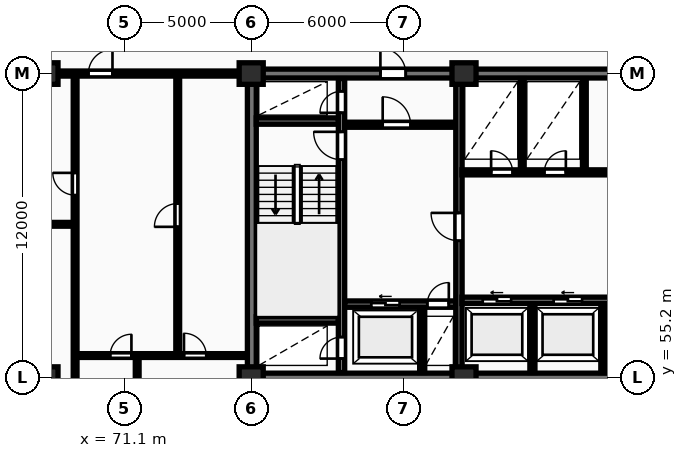
"""IFC4 building model, lengths in metres.
Left out: names, types, materials, properties, quantities, classifications, styles, units other than length and angle.
Written with IfcOpenShell. Run it as: python <this file> out.ifc"""

import sys

from ifc_helpers import new_model, si_unit, direction, frame, frame_2d, origin, origin_2d, place, context, subcontext, project, spatial, rectangle, extrude, element, fill, save


model = new_model("IFC4")
c1 = context("Model", 3, precision=1e-05, world=origin(), true_north=direction((0.0, 1.0)))
c2 = subcontext(c1, "Body", "Model", "MODEL_VIEW")
j1 = project(units=[si_unit("LENGTHUNIT", "METRE"), si_unit("PLANEANGLEUNIT", "RADIAN")], contexts=[c1])
p1 = place(None, origin())
s1 = spatial("IfcSite", under=j1, at=p1, CompositionType="ELEMENT")
p2 = place(p1, origin())
s2 = spatial("IfcBuilding", under=s1, at=p2, CompositionType="ELEMENT")
p3 = place(p2, frame((0.0, 0.0, 87.3)))
s3 = spatial("IfcBuildingStorey", under=s2, at=p3, CompositionType="ELEMENT", Elevation=87.3)
for number, where, z_axis, x_axis in (
    (1, (68.0, 55.2, 0.0), (0.0, 0.0, 1.0), (1.0, 0.0, 0.0)),
    (2, (68.0, 67.2, 0.0), (0.0, 0.0, 1.0), (1.0, 0.0, 0.0)),
    (3, (76.1, 55.2, 0.0), (0.0, 0.0, 1.0), (1.0, 0.0, 0.0)),
    (4, (76.1, 67.2, 0.0), (0.0, 0.0, 1.0), (1.0, 0.0, 0.0)),
    (5, (84.5, 55.2, 0.0), (0.0, 0.0, 1.0), (1.0, 0.0, 0.0)),
    (6, (84.5, 67.2, 0.0), (0.0, 0.0, 1.0), (1.0, 0.0, 0.0)),
):
    element("IfcColumn", number, at=place(p3, frame(where, z_axis=z_axis, x_axis=x_axis)), inside=s3, PredefinedType="COLUMN", context=c2, shape_type="SweptSolid", body=[
        extrude(rectangle(XDim=0.95, YDim=0.85, at=origin_2d()), origin(), (0.0, 0.0, 1.0), 3.25),
    ])
p4 = place(p3, frame((75.95, 55.2, 0.0), z_axis=(0.0, 0.0, 1.0), x_axis=(1.0, 0.0, 0.0)))
e7 = element("IfcWall", 7, at=p4, inside=s3, PredefinedType="SHEAR", context=c2, shape_type="SweptSolid", body=[
    extrude(rectangle(XDim=36.3, YDim=0.35, at=frame_2d((18.15, 0.0))), origin(), (0.0, 0.0, 1.0), 3.25),
])
p5 = place(p3, frame((76.125, 55.375, 0.0), z_axis=(0.0, 0.0, 1.0), x_axis=(0.0, 1.0, 0.0)))
e8 = element("IfcWall", 8, at=p5, inside=s3, PredefinedType="SHEAR", context=c2, shape_type="SweptSolid", body=[
    extrude(rectangle(XDim=11.65, YDim=0.35, at=frame_2d((5.825, 0.0))), origin(), (0.0, 0.0, 1.0), 3.25),
])
p6 = place(p3, frame((75.95, 67.2, 0.0), z_axis=(0.0, 0.0, 1.0), x_axis=(1.0, 0.0, 0.0)))
e9 = element("IfcWall", 9, at=p6, inside=s3, PredefinedType="SHEAR", context=c2, shape_type="SweptSolid", body=[
    extrude(rectangle(XDim=36.3, YDim=0.35, at=frame_2d((18.15, 0.0))), origin(), (0.0, 0.0, 1.0), 3.25),
])
p7 = place(p6, frame((5.25, 0.0, 0.0)))
e10 = element("IfcOpeningElement", 10, at=p7, cuts=e9, PredefinedType="OPENING", context=c2, shape_type="SweptSolid", body=[
    extrude(rectangle(XDim=1.0, YDim=2.15, at=frame_2d((0.5, 1.075))), frame((0.0, 0.185, 0.0), z_axis=(0.0, -1.0, 0.0), x_axis=(1.0, 0.0, 0.0)), (0.0, 0.0, 1.0), 0.37),
])
p8 = place(p6, frame((21.6, 0.0, 0.0)))
e11 = element("IfcOpeningElement", 11, at=p8, cuts=e9, PredefinedType="OPENING", context=c2, shape_type="SweptSolid", body=[
    extrude(rectangle(XDim=1.5, YDim=2.2, at=frame_2d((0.75, 1.1))), frame((0.0, 0.185, 0.0), z_axis=(0.0, -1.0, 0.0), x_axis=(1.0, 0.0, 0.0)), (0.0, 0.0, 1.0), 0.37),
])
p9 = place(p6, frame((30.45, 0.0, 0.0)))
e12 = element("IfcOpeningElement", 12, at=p9, cuts=e9, PredefinedType="OPENING", context=c2, shape_type="SweptSolid", body=[
    extrude(rectangle(XDim=1.0, YDim=2.15, at=frame_2d((0.5, 1.075))), frame((0.0, 0.185, 0.0), z_axis=(0.0, -1.0, 0.0), x_axis=(1.0, 0.0, 0.0)), (0.0, 0.0, 1.0), 0.37),
])
p10 = place(p3, frame((79.665, 55.4, 0.0), z_axis=(0.0, 0.0, 1.0), x_axis=(0.0, 1.0, 0.0)))
e13 = element("IfcWall", 13, at=p10, inside=s3, PredefinedType="SHEAR", context=c2, shape_type="SweptSolid", body=[
    extrude(rectangle(XDim=11.6, YDim=0.25, at=frame_2d((5.8, 0.0))), origin(), (0.0, 0.0, 1.0), 3.25),
])
p11 = place(p10, frame((0.55, 0.0, 0.0)))
e14 = element("IfcOpeningElement", 14, at=p11, cuts=e13, PredefinedType="OPENING", context=c2, shape_type="SweptSolid", body=[
    extrude(rectangle(XDim=0.85, YDim=2.05, at=frame_2d((0.425, 1.025))), frame((0.0, 0.135, 0.0), z_axis=(0.0, -1.0, 0.0), x_axis=(1.0, 0.0, 0.0)), (0.0, 0.0, 1.0), 0.27),
])
p12 = place(p10, frame((8.4, 0.0, 0.0)))
e15 = element("IfcOpeningElement", 15, at=p12, cuts=e13, PredefinedType="OPENING", context=c2, shape_type="SweptSolid", body=[
    extrude(rectangle(XDim=1.1, YDim=2.1, at=frame_2d((0.55, 1.05))), frame((0.0, 0.135, 0.0), z_axis=(0.0, -1.0, 0.0), x_axis=(1.0, 0.0, 0.0)), (0.0, 0.0, 1.0), 0.27),
])
p13 = place(p10, frame((10.25, 0.0, 0.0)))
e16 = element("IfcOpeningElement", 16, at=p13, cuts=e13, PredefinedType="OPENING", context=c2, shape_type="SweptSolid", body=[
    extrude(rectangle(XDim=0.85, YDim=2.05, at=frame_2d((0.425, 1.025))), frame((0.0, 0.135, 0.0), z_axis=(0.0, -1.0, 0.0), x_axis=(1.0, 0.0, 0.0)), (0.0, 0.0, 1.0), 0.27),
])
for number, where, z_axis, x_axis in (
    (17, (76.3, 57.475, 0.0), (0.0, 0.0, 1.0), (1.0, 0.0, 0.0)),
    (18, (76.3, 65.325, 0.0), (0.0, 0.0, 1.0), (1.0, 0.0, 0.0)),
):
    element("IfcWall", number, at=place(p3, frame(where, z_axis=z_axis, x_axis=x_axis)), inside=s3, PredefinedType="SHEAR", context=c2, shape_type="SweptSolid", body=[
        extrude(rectangle(XDim=3.24, YDim=0.25, at=frame_2d((1.62, 0.0))), origin(), (0.0, 0.0, 1.0), 3.25),
    ])
p14 = place(p3, frame((79.79, 58.1, 0.0), z_axis=(0.0, 0.0, 1.0), x_axis=(1.0, 0.0, 0.0)))
e19 = element("IfcWall", 19, at=p14, inside=s3, PredefinedType="SHEAR", context=c2, shape_type="SweptSolid", body=[
    extrude(rectangle(XDim=4.39, YDim=0.25, at=frame_2d((2.195, 0.0))), origin(), (0.0, 0.0, 1.0), 3.25),
])
p15 = place(p14, frame((1.05, 0.0, 0.0)))
e20 = element("IfcOpeningElement", 20, at=p15, cuts=e19, PredefinedType="OPENING", context=c2, shape_type="SweptSolid", body=[
    extrude(rectangle(XDim=1.12, YDim=2.12, at=frame_2d((0.56, 1.06))), frame((0.0, 0.135, 0.0), z_axis=(0.0, -1.0, 0.0), x_axis=(1.0, 0.0, 0.0)), (0.0, 0.0, 1.0), 0.27),
])
p16 = place(p14, frame((3.26, 0.0, 0.0)))
e21 = element("IfcOpeningElement", 21, at=p16, cuts=e19, PredefinedType="OPENING", context=c2, shape_type="SweptSolid", body=[
    extrude(rectangle(XDim=0.85, YDim=2.05, at=frame_2d((0.425, 1.025))), frame((0.0, 0.135, 0.0), z_axis=(0.0, -1.0, 0.0), x_axis=(1.0, 0.0, 0.0)), (0.0, 0.0, 1.0), 0.27),
])
p17 = place(p3, frame((82.85, 55.4, 0.0), z_axis=(0.0, 0.0, 1.0), x_axis=(0.0, 1.0, 0.0)))
e22 = element("IfcWall", 22, at=p17, inside=s3, PredefinedType="PARTITIONING", context=c2, shape_type="SweptSolid", body=[
    extrude(rectangle(XDim=2.56, YDim=0.2, at=frame_2d((1.28, 0.0))), origin(), (0.0, 0.0, 1.0), 2.97),
])
p18 = place(p3, frame((79.79, 65.18, 0.0), z_axis=(0.0, 0.0, 1.0), x_axis=(1.0, 0.0, 0.0)))
e23 = element("IfcWall", 23, at=p18, inside=s3, PredefinedType="PARTITIONING", context=c2, shape_type="SweptSolid", body=[
    extrude(rectangle(XDim=4.39, YDim=0.2, at=frame_2d((2.195, 0.0))), origin(), (0.0, 0.0, 1.0), 2.97),
])
p19 = place(p18, frame((1.5, 0.0, 0.0)))
e24 = element("IfcOpeningElement", 24, at=p19, cuts=e23, PredefinedType="OPENING", context=c2, shape_type="SweptSolid", body=[
    extrude(rectangle(XDim=1.1, YDim=2.1, at=frame_2d((0.55, 1.05))), frame((0.0, 0.11, 0.0), z_axis=(0.0, -1.0, 0.0), x_axis=(1.0, 0.0, 0.0)), (0.0, 0.0, 1.0), 0.22),
])
p20 = place(p3, frame((84.3, 55.4, 0.0), z_axis=(0.0, 0.0, 1.0), x_axis=(0.0, 1.0, 0.0)))
e25 = element("IfcWall", 25, at=p20, inside=s3, PredefinedType="SHEAR", context=c2, shape_type="SweptSolid", body=[
    extrude(rectangle(XDim=11.6, YDim=0.25, at=frame_2d((5.8, 0.0))), origin(), (0.0, 0.0, 1.0), 3.25),
])
p21 = place(p20, frame((5.2, 0.0, 0.0)))
e26 = element("IfcOpeningElement", 26, at=p21, cuts=e25, PredefinedType="OPENING", context=c2, shape_type="SweptSolid", body=[
    extrude(rectangle(XDim=1.1, YDim=2.1, at=frame_2d((0.55, 1.05))), frame((0.0, 0.135, 0.0), z_axis=(0.0, -1.0, 0.0), x_axis=(1.0, 0.0, 0.0)), (0.0, 0.0, 1.0), 0.27),
])
for number, where, z_axis, x_axis in (
    (27, (87.2, 55.4, 0.0), (0.0, 0.0, 1.0), (0.0, 1.0, 0.0)),
    (28, (90.0, 55.4, 0.0), (0.0, 0.0, 1.0), (0.0, 1.0, 0.0)),
):
    element("IfcWall", number, at=place(p3, frame(where, z_axis=z_axis, x_axis=x_axis)), inside=s3, PredefinedType="PARTITIONING", context=c2, shape_type="SweptSolid", body=[
        extrude(rectangle(XDim=2.72, YDim=0.2, at=frame_2d((1.36, 0.0))), origin(), (0.0, 0.0, 1.0), 2.97),
    ])
p22 = place(p3, frame((84.42, 58.25, 0.0), z_axis=(0.0, 0.0, 1.0), x_axis=(1.0, 0.0, 0.0)))
e29 = element("IfcWall", 29, at=p22, inside=s3, PredefinedType="SHEAR", context=c2, shape_type="SweptSolid", body=[
    extrude(rectangle(XDim=8.36, YDim=0.25, at=frame_2d((4.18, 0.0))), origin(), (0.0, 0.0, 1.0), 3.25),
])
p23 = place(p22, frame((0.82, 0.0, 0.0)))
e30 = element("IfcOpeningElement", 30, at=p23, cuts=e29, PredefinedType="OPENING", context=c2, shape_type="SweptSolid", body=[
    extrude(rectangle(XDim=1.12, YDim=2.12, at=frame_2d((0.56, 1.06))), frame((0.0, 0.135, 0.0), z_axis=(0.0, -1.0, 0.0), x_axis=(1.0, 0.0, 0.0)), (0.0, 0.0, 1.0), 0.27),
])
p24 = place(p22, frame((3.62, 0.0, 0.0)))
e31 = element("IfcOpeningElement", 31, at=p24, cuts=e29, PredefinedType="OPENING", context=c2, shape_type="SweptSolid", body=[
    extrude(rectangle(XDim=1.12, YDim=2.12, at=frame_2d((0.56, 1.06))), frame((0.0, 0.135, 0.0), z_axis=(0.0, -1.0, 0.0), x_axis=(1.0, 0.0, 0.0)), (0.0, 0.0, 1.0), 0.27),
])
p25 = place(p22, frame((6.42, 0.0, 0.0)))
e32 = element("IfcOpeningElement", 32, at=p25, cuts=e29, PredefinedType="OPENING", context=c2, shape_type="SweptSolid", body=[
    extrude(rectangle(XDim=1.12, YDim=2.12, at=frame_2d((0.56, 1.06))), frame((0.0, 0.135, 0.0), z_axis=(0.0, -1.0, 0.0), x_axis=(1.0, 0.0, 0.0)), (0.0, 0.0, 1.0), 0.27),
])
for number, where, z_axis, x_axis in (
    (33, (86.8, 63.4, 0.0), (0.0, 0.0, 1.0), (0.0, 1.0, 0.0)),
    (34, (89.25, 63.4, 0.0), (0.0, 0.0, 1.0), (0.0, 1.0, 0.0)),
):
    element("IfcWall", number, at=place(p3, frame(where, z_axis=z_axis, x_axis=x_axis)), inside=s3, PredefinedType="PARTITIONING", context=c2, shape_type="SweptSolid", body=[
        extrude(rectangle(XDim=3.6, YDim=0.15, at=frame_2d((1.8, 0.0))), origin(), (0.0, 0.0, 1.0), 2.97),
    ])
p26 = place(p3, frame((84.42, 63.3, 0.0), z_axis=(0.0, 0.0, 1.0), x_axis=(1.0, 0.0, 0.0)))
e35 = element("IfcWall", 35, at=p26, inside=s3, PredefinedType="PARTITIONING", context=c2, shape_type="SweptSolid", body=[
    extrude(rectangle(XDim=19.83, YDim=0.2, at=frame_2d((9.915, 0.0))), origin(), (0.0, 0.0, 1.0), 2.97),
])
p27 = place(p26, frame((1.15, 0.0, 0.0)))
e36 = element("IfcOpeningElement", 36, at=p27, cuts=e35, PredefinedType="OPENING", context=c2, shape_type="SweptSolid", body=[
    extrude(rectangle(XDim=0.85, YDim=2.05, at=frame_2d((0.425, 1.025))), frame((0.0, 0.11, 0.0), z_axis=(0.0, -1.0, 0.0), x_axis=(1.0, 0.0, 0.0)), (0.0, 0.0, 1.0), 0.22),
])
p28 = place(p26, frame((3.25, 0.0, 0.0)))
e37 = element("IfcOpeningElement", 37, at=p28, cuts=e35, PredefinedType="OPENING", context=c2, shape_type="SweptSolid", body=[
    extrude(rectangle(XDim=0.85, YDim=2.05, at=frame_2d((0.425, 1.025))), frame((0.0, 0.11, 0.0), z_axis=(0.0, -1.0, 0.0), x_axis=(1.0, 0.0, 0.0)), (0.0, 0.0, 1.0), 0.22),
])
p29 = place(p26, frame((13.08, 0.0, 0.0)))
e38 = element("IfcOpeningElement", 38, at=p29, cuts=e35, PredefinedType="OPENING", context=c2, shape_type="SweptSolid", body=[
    extrude(rectangle(XDim=1.5, YDim=2.2, at=frame_2d((0.75, 1.1))), frame((0.0, 0.11, 0.0), z_axis=(0.0, -1.0, 0.0), x_axis=(1.0, 0.0, 0.0)), (0.0, 0.0, 1.0), 0.22),
])
p30 = place(p26, frame((6.78, 0.0, 0.0)))
e39 = element("IfcOpeningElement", 39, at=p30, cuts=e35, PredefinedType="OPENING", context=c2, shape_type="SweptSolid", body=[
    extrude(rectangle(XDim=0.92, YDim=2.08, at=frame_2d((0.46, 1.04))), frame((0.0, 0.11, 0.0), z_axis=(0.0, -1.0, 0.0), x_axis=(1.0, 0.0, 0.0)), (0.0, 0.0, 1.0), 0.22),
])
p31 = place(p26, frame((16.28, 0.0, 0.0)))
e40 = element("IfcOpeningElement", 40, at=p31, cuts=e35, PredefinedType="OPENING", context=c2, shape_type="SweptSolid", body=[
    extrude(rectangle(XDim=0.92, YDim=2.08, at=frame_2d((0.46, 1.04))), frame((0.0, 0.11, 0.0), z_axis=(0.0, -1.0, 0.0), x_axis=(1.0, 0.0, 0.0)), (0.0, 0.0, 1.0), 0.22),
])
p32 = place(p3, frame((57.6, 61.25, 0.0), z_axis=(0.0, 0.0, 1.0), x_axis=(1.0, 0.0, 0.0)))
e41 = element("IfcWall", 41, at=p32, inside=s3, PredefinedType="PARTITIONING", context=c2, shape_type="SweptSolid", body=[
    extrude(rectangle(XDim=11.55, YDim=0.15, at=frame_2d((5.775, 0.0))), origin(), (0.0, 0.0, 1.0), 2.97),
])
p33 = place(p32, frame((5.355, 0.0, 0.0)))
e42 = element("IfcOpeningElement", 42, at=p33, cuts=e41, PredefinedType="OPENING", context=c2, shape_type="SweptSolid", body=[
    extrude(rectangle(XDim=0.84, YDim=2.04, at=frame_2d((0.42, 1.02))), frame((0.0, 0.085, 0.0), z_axis=(0.0, -1.0, 0.0), x_axis=(1.0, 0.0, 0.0)), (0.0, 0.0, 1.0), 0.17),
])
p34 = place(p3, frame((69.15, 51.1, 0.0), z_axis=(0.0, 0.0, 1.0), x_axis=(0.0, 1.0, 0.0)))
e43 = element("IfcWall", 43, at=p34, inside=s3, PredefinedType="PARTITIONING", context=c2, shape_type="SweptSolid", body=[
    extrude(rectangle(XDim=16.05, YDim=0.15, at=frame_2d((8.025, 0.0))), origin(), (0.0, 0.0, 1.0), 2.97),
])
p35 = place(p34, frame((11.3, 0.0, 0.0)))
e44 = element("IfcOpeningElement", 44, at=p35, cuts=e43, PredefinedType="OPENING", context=c2, shape_type="SweptSolid", body=[
    extrude(rectangle(XDim=0.88, YDim=2.06, at=frame_2d((0.44, 1.03))), frame((0.0, 0.085, 0.0), z_axis=(0.0, -1.0, 0.0), x_axis=(1.0, 0.0, 0.0)), (0.0, 0.0, 1.0), 0.17),
])
p36 = place(p3, frame((73.2, 56.07, 0.0), z_axis=(0.0, 0.0, 1.0), x_axis=(0.0, 1.0, 0.0)))
e45 = element("IfcWall", 45, at=p36, inside=s3, PredefinedType="PARTITIONING", context=c2, shape_type="SweptSolid", body=[
    extrude(rectangle(XDim=11.08, YDim=0.15, at=frame_2d((5.54, 0.0))), origin(), (0.0, 0.0, 1.0), 2.97),
])
p37 = place(p36, frame((5.08, 0.0, 0.0)))
e46 = element("IfcOpeningElement", 46, at=p37, cuts=e45, PredefinedType="OPENING", context=c2, shape_type="SweptSolid", body=[
    extrude(rectangle(XDim=0.92, YDim=2.08, at=frame_2d((0.46, 1.04))), frame((0.0, 0.085, 0.0), z_axis=(0.0, -1.0, 0.0), x_axis=(1.0, 0.0, 0.0)), (0.0, 0.0, 1.0), 0.17),
])
p38 = place(p3, frame((71.6, 51.1, 0.0), z_axis=(0.0, 0.0, 1.0), x_axis=(0.0, 1.0, 0.0)))
e47 = element("IfcWall", 47, at=p38, inside=s3, PredefinedType="PARTITIONING", context=c2, shape_type="SweptSolid", body=[
    extrude(rectangle(XDim=4.97, YDim=0.15, at=frame_2d((2.485, 0.0))), origin(), (0.0, 0.0, 1.0), 2.97),
])
p39 = place(p3, frame((69.17, 56.07, 0.0), z_axis=(0.0, 0.0, 1.0), x_axis=(1.0, 0.0, 0.0)))
e48 = element("IfcWall", 48, at=p39, inside=s3, PredefinedType="PARTITIONING", context=c2, shape_type="SweptSolid", body=[
    extrude(rectangle(XDim=6.76, YDim=0.15, at=frame_2d((3.38, 0.0))), origin(), (0.0, 0.0, 1.0), 2.97),
])
p40 = place(p39, frame((1.362, 0.0, 0.0)))
e49 = element("IfcOpeningElement", 49, at=p40, cuts=e48, PredefinedType="OPENING", context=c2, shape_type="SweptSolid", body=[
    extrude(rectangle(XDim=0.84, YDim=2.04, at=frame_2d((0.42, 1.02))), frame((0.0, 0.085, 0.0), z_axis=(0.0, -1.0, 0.0), x_axis=(1.0, 0.0, 0.0)), (0.0, 0.0, 1.0), 0.17),
])
p41 = place(p39, frame((4.277, 0.0, 0.0)))
e50 = element("IfcOpeningElement", 50, at=p41, cuts=e48, PredefinedType="OPENING", context=c2, shape_type="SweptSolid", body=[
    extrude(rectangle(XDim=0.88, YDim=2.06, at=frame_2d((0.44, 1.03))), frame((0.0, 0.085, 0.0), z_axis=(0.0, -1.0, 0.0), x_axis=(1.0, 0.0, 0.0)), (0.0, 0.0, 1.0), 0.17),
])
p42 = place(p3, frame((57.6, 67.2, 0.0), z_axis=(0.0, 0.0, 1.0), x_axis=(1.0, 0.0, 0.0)))
e51 = element("IfcWall", 51, at=p42, inside=s3, PredefinedType="PARTITIONING", context=c2, shape_type="SweptSolid", body=[
    extrude(rectangle(XDim=18.35, YDim=0.2, at=frame_2d((9.175, 0.0))), origin(), (0.0, 0.0, 1.0), 2.433),
])
p43 = place(p42, frame((12.075, 0.0, 0.0)))
e52 = element("IfcOpeningElement", 52, at=p43, cuts=e51, PredefinedType="OPENING", context=c2, shape_type="SweptSolid", body=[
    extrude(rectangle(XDim=0.95, YDim=2.15, at=frame_2d((0.475, 1.075))), frame((0.0, 0.11, 0.0), z_axis=(0.0, -1.0, 0.0), x_axis=(1.0, 0.0, 0.0)), (0.0, 0.0, 1.0), 0.22),
])
p44 = place(p7, origin())
e53 = element("IfcDoor", 53, at=p44, inside=s3, OperationType="SINGLE_SWING_LEFT", PredefinedType="DOOR", context=c2, shape_type="SweptSolid", body=[
    extrude(rectangle(XDim=1.0, YDim=2.15, at=frame_2d((0.5, 1.075))), frame((0.0, 0.025, 0.0), z_axis=(0.0, -1.0, 0.0), x_axis=(1.0, 0.0, 0.0)), (0.0, 0.0, 1.0), 0.05),
])
fill(e10, e53)
p45 = place(p11, origin())
e54 = element("IfcDoor", 54, at=p45, inside=s3, OperationType="SINGLE_SWING_LEFT", PredefinedType="DOOR", context=c2, shape_type="SweptSolid", body=[
    extrude(rectangle(XDim=0.85, YDim=2.05, at=frame_2d((0.425, 1.025))), frame((0.0, 0.025, 0.0), z_axis=(0.0, -1.0, 0.0), x_axis=(1.0, 0.0, 0.0)), (0.0, 0.0, 1.0), 0.05),
])
fill(e14, e54)
p46 = place(p12, origin())
e55 = element("IfcDoor", 55, at=p46, inside=s3, OperationType="SINGLE_SWING_RIGHT", PredefinedType="DOOR", context=c2, shape_type="SweptSolid", body=[
    extrude(rectangle(XDim=1.1, YDim=2.1, at=frame_2d((0.55, 1.05))), frame((0.0, 0.025, 0.0), z_axis=(0.0, -1.0, 0.0), x_axis=(1.0, 0.0, 0.0)), (0.0, 0.0, 1.0), 0.05),
])
fill(e15, e55)
p47 = place(p13, origin())
e56 = element("IfcDoor", 56, at=p47, inside=s3, OperationType="SINGLE_SWING_LEFT", PredefinedType="DOOR", context=c2, shape_type="SweptSolid", body=[
    extrude(rectangle(XDim=0.85, YDim=2.05, at=frame_2d((0.425, 1.025))), frame((0.0, 0.025, 0.0), z_axis=(0.0, -1.0, 0.0), x_axis=(1.0, 0.0, 0.0)), (0.0, 0.0, 1.0), 0.05),
])
fill(e16, e56)
p48 = place(p15, origin())
e57 = element("IfcDoor", 57, at=p48, inside=s3, OperationType="SLIDING_TO_LEFT", PredefinedType="DOOR", context=c2, shape_type="SweptSolid", body=[
    extrude(rectangle(XDim=1.12, YDim=2.12, at=frame_2d((0.56, 1.06))), frame((0.0, 0.025, 0.0), z_axis=(0.0, -1.0, 0.0), x_axis=(1.0, 0.0, 0.0)), (0.0, 0.0, 1.0), 0.05),
])
fill(e20, e57)
p49 = place(p16, origin())
e58 = element("IfcDoor", 58, at=p49, inside=s3, OperationType="SINGLE_SWING_RIGHT", PredefinedType="DOOR", context=c2, shape_type="SweptSolid", body=[
    extrude(rectangle(XDim=0.85, YDim=2.05, at=frame_2d((0.425, 1.025))), frame((0.0, 0.025, 0.0), z_axis=(0.0, -1.0, 0.0), x_axis=(1.0, 0.0, 0.0)), (0.0, 0.0, 1.0), 0.05),
])
fill(e21, e58)
p50 = place(p19, origin())
e59 = element("IfcDoor", 59, at=p50, inside=s3, OperationType="SINGLE_SWING_LEFT", PredefinedType="DOOR", context=c2, shape_type="SweptSolid", body=[
    extrude(rectangle(XDim=1.1, YDim=2.1, at=frame_2d((0.55, 1.05))), frame((0.0, 0.025, 0.0), z_axis=(0.0, -1.0, 0.0), x_axis=(1.0, 0.0, 0.0)), (0.0, 0.0, 1.0), 0.05),
])
fill(e24, e59)
p51 = place(p21, origin())
e60 = element("IfcDoor", 60, at=p51, inside=s3, OperationType="SINGLE_SWING_RIGHT", PredefinedType="DOOR", context=c2, shape_type="SweptSolid", body=[
    extrude(rectangle(XDim=1.1, YDim=2.1, at=frame_2d((0.55, 1.05))), frame((0.0, 0.025, 0.0), z_axis=(0.0, -1.0, 0.0), x_axis=(1.0, 0.0, 0.0)), (0.0, 0.0, 1.0), 0.05),
])
fill(e26, e60)
p52 = place(p23, origin())
e61 = element("IfcDoor", 61, at=p52, inside=s3, OperationType="SLIDING_TO_LEFT", PredefinedType="DOOR", context=c2, shape_type="SweptSolid", body=[
    extrude(rectangle(XDim=1.12, YDim=2.12, at=frame_2d((0.56, 1.06))), frame((0.0, 0.025, 0.0), z_axis=(0.0, -1.0, 0.0), x_axis=(1.0, 0.0, 0.0)), (0.0, 0.0, 1.0), 0.05),
])
fill(e30, e61)
p53 = place(p24, origin())
e62 = element("IfcDoor", 62, at=p53, inside=s3, OperationType="SLIDING_TO_LEFT", PredefinedType="DOOR", context=c2, shape_type="SweptSolid", body=[
    extrude(rectangle(XDim=1.12, YDim=2.12, at=frame_2d((0.56, 1.06))), frame((0.0, 0.025, 0.0), z_axis=(0.0, -1.0, 0.0), x_axis=(1.0, 0.0, 0.0)), (0.0, 0.0, 1.0), 0.05),
])
fill(e31, e62)
p54 = place(p27, origin())
e63 = element("IfcDoor", 63, at=p54, inside=s3, OperationType="SINGLE_SWING_LEFT", PredefinedType="DOOR", context=c2, shape_type="SweptSolid", body=[
    extrude(rectangle(XDim=0.85, YDim=2.05, at=frame_2d((0.425, 1.025))), frame((0.0, 0.025, 0.0), z_axis=(0.0, -1.0, 0.0), x_axis=(1.0, 0.0, 0.0)), (0.0, 0.0, 1.0), 0.05),
])
fill(e36, e63)
p55 = place(p28, origin())
e64 = element("IfcDoor", 64, at=p55, inside=s3, OperationType="SINGLE_SWING_RIGHT", PredefinedType="DOOR", context=c2, shape_type="SweptSolid", body=[
    extrude(rectangle(XDim=0.85, YDim=2.05, at=frame_2d((0.425, 1.025))), frame((0.0, 0.025, 0.0), z_axis=(0.0, -1.0, 0.0), x_axis=(1.0, 0.0, 0.0)), (0.0, 0.0, 1.0), 0.05),
])
fill(e37, e64)
p56 = place(p35, origin())
e65 = element("IfcDoor", 65, at=p56, inside=s3, OperationType="SINGLE_SWING_RIGHT", PredefinedType="DOOR", context=c2, shape_type="SweptSolid", body=[
    extrude(rectangle(XDim=0.88, YDim=2.06, at=frame_2d((0.44, 1.03))), frame((0.0, 0.025, 0.0), z_axis=(0.0, -1.0, 0.0), x_axis=(1.0, 0.0, 0.0)), (0.0, 0.0, 1.0), 0.05),
])
fill(e44, e65)
p57 = place(p37, origin())
e66 = element("IfcDoor", 66, at=p57, inside=s3, OperationType="SINGLE_SWING_LEFT", PredefinedType="DOOR", context=c2, shape_type="SweptSolid", body=[
    extrude(rectangle(XDim=0.92, YDim=2.08, at=frame_2d((0.46, 1.04))), frame((0.0, 0.025, 0.0), z_axis=(0.0, -1.0, 0.0), x_axis=(1.0, 0.0, 0.0)), (0.0, 0.0, 1.0), 0.05),
])
fill(e46, e66)
p58 = place(p40, origin())
e67 = element("IfcDoor", 67, at=p58, inside=s3, OperationType="SINGLE_SWING_RIGHT", PredefinedType="DOOR", context=c2, shape_type="SweptSolid", body=[
    extrude(rectangle(XDim=0.84, YDim=2.04, at=frame_2d((0.42, 1.02))), frame((0.0, 0.025, 0.0), z_axis=(0.0, -1.0, 0.0), x_axis=(1.0, 0.0, 0.0)), (0.0, 0.0, 1.0), 0.05),
])
fill(e49, e67)
p59 = place(p41, origin())
e68 = element("IfcDoor", 68, at=p59, inside=s3, OperationType="SINGLE_SWING_LEFT", PredefinedType="DOOR", context=c2, shape_type="SweptSolid", body=[
    extrude(rectangle(XDim=0.88, YDim=2.06, at=frame_2d((0.44, 1.03))), frame((0.0, 0.025, 0.0), z_axis=(0.0, -1.0, 0.0), x_axis=(1.0, 0.0, 0.0)), (0.0, 0.0, 1.0), 0.05),
])
fill(e50, e68)
p60 = place(p43, origin())
e69 = element("IfcDoor", 69, at=p60, inside=s3, OperationType="SINGLE_SWING_RIGHT", PredefinedType="DOOR", context=c2, shape_type="SweptSolid", body=[
    extrude(rectangle(XDim=0.95, YDim=2.15, at=frame_2d((0.475, 1.075))), frame((0.0, 0.025, 0.0), z_axis=(0.0, -1.0, 0.0), x_axis=(1.0, 0.0, 0.0)), (0.0, 0.0, 1.0), 0.05),
])
fill(e52, e69)
save(model, sys.argv[1])
